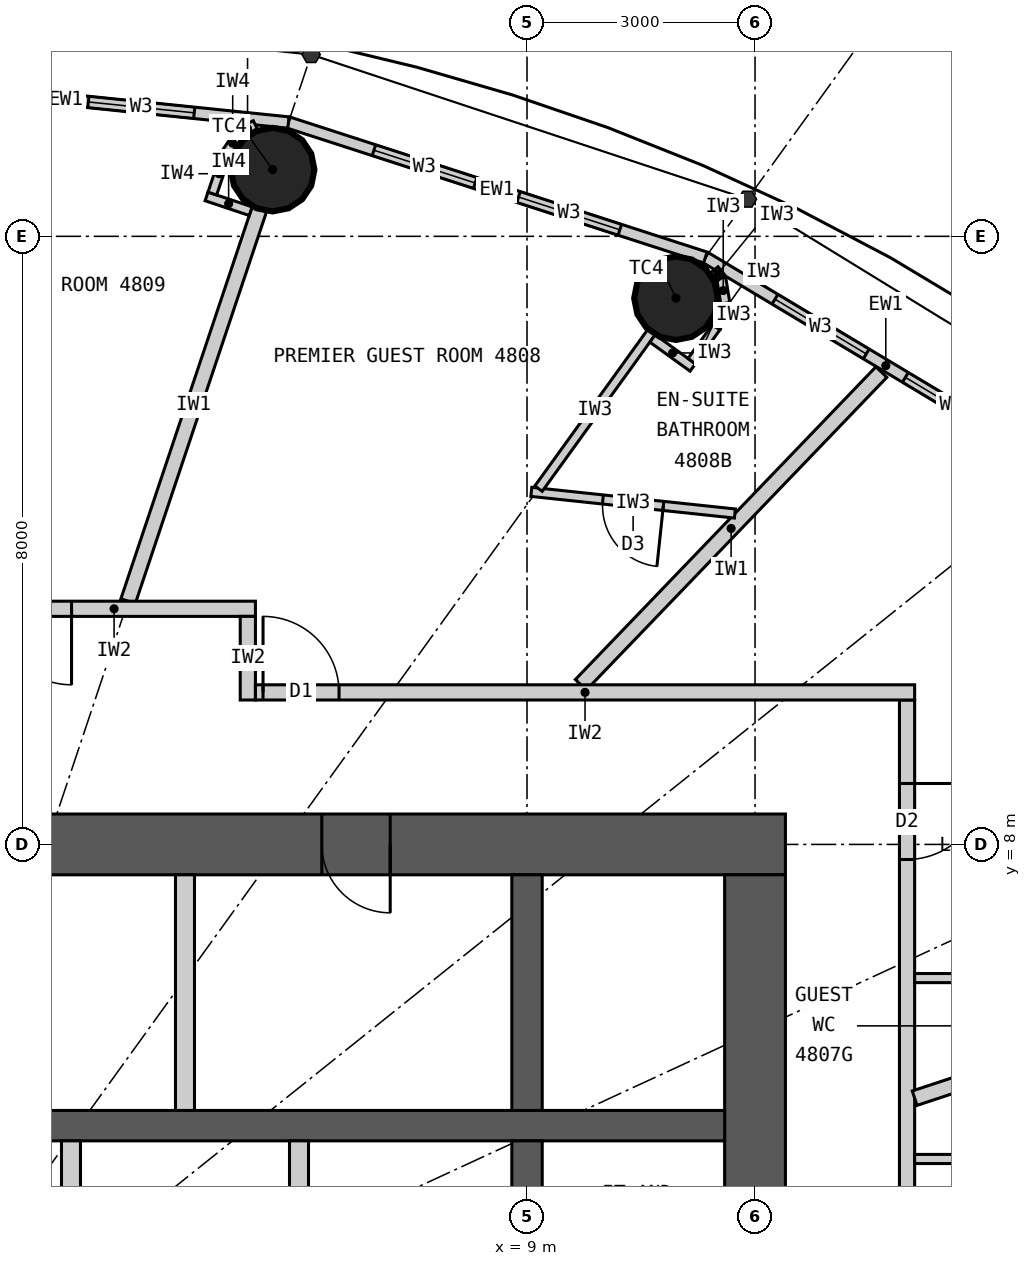
"""IFC4 building model, lengths in metres.
Left out: names, types, materials, properties, quantities, classifications, styles, units other than length and angle.
Written with IfcOpenShell. Run it as: python <this file> out.ifc"""

import sys

from ifc_helpers import new_model, si_unit, direction, frame, frame_2d, origin, origin_2d, place, context, subcontext, project, spatial, rectangle, circle, extrude, element, fill, save


model = new_model("IFC4")
c1 = context("Model", 3, precision=1e-05, world=origin(), true_north=direction((0.0, 1.0)))
c2 = subcontext(c1, "Body", "Model", "MODEL_VIEW")
j1 = project(units=[si_unit("LENGTHUNIT", "METRE"), si_unit("PLANEANGLEUNIT", "RADIAN")], contexts=[c1])
p1 = place(None, origin())
s1 = spatial("IfcSite", under=j1, at=p1, CompositionType="ELEMENT")
p2 = place(p1, origin())
s2 = spatial("IfcBuilding", under=s1, at=p2, CompositionType="ELEMENT")
p3 = place(p2, frame((0.0, 0.0, 179.7)))
s3 = spatial("IfcBuildingStorey", under=s2, at=p3, CompositionType="ELEMENT", Elevation=179.7)
for number, where, z_axis, x_axis in (
    (1, (10.96, 15.186, 0.0), (0.0, 0.0, 1.0), (1.0, 0.0, 0.0)),
    (2, (5.653, 16.877, 0.0), (0.0, 0.0, 1.0), (1.0, 0.0, 0.0)),
):
    element("IfcColumn", number, at=place(p3, frame(where, z_axis=z_axis, x_axis=x_axis)), inside=s3, PredefinedType="COLUMN", context=c2, shape_type="SweptSolid", body=[
        extrude(circle(Radius=0.55, at=origin_2d()), origin(), (0.0, 0.0, 1.0), 3.3),
    ])
p4 = place(p3, frame((-12.4, 8.0, 0.0), z_axis=(0.0, 0.0, 1.0), x_axis=(1.0, 0.0, 0.0)))
e3 = element("IfcWall", 3, at=p4, inside=s3, PredefinedType="SHEAR", context=c2, shape_type="SweptSolid", body=[
    extrude(rectangle(XDim=24.8, YDim=0.8, at=frame_2d((12.4, 0.0))), origin(), (0.0, 0.0, 1.0), 3.3),
])
p5 = place(p4, frame((11.1, 0.0, 0.0)))
e4 = element("IfcOpeningElement", 4, at=p5, cuts=e3, PredefinedType="OPENING", context=c2, shape_type="SweptSolid", body=[
    extrude(rectangle(XDim=1.2, YDim=2.2, at=frame_2d((0.6, 1.1))), frame((0.0, 0.41, 0.0), z_axis=(0.0, -1.0, 0.0), x_axis=(1.0, 0.0, 0.0)), (0.0, 0.0, 1.0), 0.82),
])
p6 = place(p4, frame((18.7, 0.0, 0.0)))
e5 = element("IfcOpeningElement", 5, at=p6, cuts=e3, PredefinedType="OPENING", context=c2, shape_type="SweptSolid", body=[
    extrude(rectangle(XDim=0.9, YDim=2.2, at=frame_2d((0.45, 1.1))), frame((0.0, 0.41, 0.0), z_axis=(0.0, -1.0, 0.0), x_axis=(1.0, 0.0, 0.0)), (0.0, 0.0, 1.0), 0.82),
])
p7 = place(p3, frame((12.0, -7.6, 0.0), z_axis=(0.0, 0.0, 1.0), x_axis=(0.0, 1.0, 0.0)))
e6 = element("IfcWall", 6, at=p7, inside=s3, PredefinedType="SHEAR", context=c2, shape_type="SweptSolid", body=[
    extrude(rectangle(XDim=15.2, YDim=0.8, at=frame_2d((7.6, 0.0))), origin(), (0.0, 0.0, 1.0), 3.3),
])
p8 = place(p7, frame((6.7, 0.0, 0.0)))
e7 = element("IfcOpeningElement", 7, at=p8, cuts=e6, PredefinedType="OPENING", context=c2, shape_type="SweptSolid", body=[
    extrude(rectangle(XDim=1.8, YDim=2.2, at=frame_2d((0.9, 1.1))), frame((0.0, 0.41, 0.0), z_axis=(0.0, -1.0, 0.0), x_axis=(1.0, 0.0, 0.0)), (0.0, 0.0, 1.0), 0.82),
])
p9 = place(p3, frame((-11.6, 4.3, 0.0), z_axis=(0.0, 0.0, 1.0), x_axis=(1.0, 0.0, 0.0)))
e8 = element("IfcWall", 8, at=p9, inside=s3, PredefinedType="SHEAR", context=c2, shape_type="SweptSolid", body=[
    extrude(rectangle(XDim=23.2, YDim=0.4, at=frame_2d((11.6, 0.0))), origin(), (0.0, 0.0, 1.0), 3.3),
])
p10 = place(p3, frame((9.0, 4.5, 0.0), z_axis=(0.0, 0.0, 1.0), x_axis=(0.0, 1.0, 0.0)))
e9 = element("IfcWall", 9, at=p10, inside=s3, PredefinedType="SHEAR", context=c2, shape_type="SweptSolid", body=[
    extrude(rectangle(XDim=3.1, YDim=0.4, at=frame_2d((1.55, 0.0))), origin(), (0.0, 0.0, 1.0), 3.3),
])
p11 = place(p3, frame((9.0, 1.75, 0.0), z_axis=(0.0, 0.0, 1.0), x_axis=(0.0, 1.0, 0.0)))
e10 = element("IfcWall", 10, at=p11, inside=s3, PredefinedType="SHEAR", context=c2, shape_type="SweptSolid", body=[
    extrude(rectangle(XDim=2.35, YDim=0.4, at=frame_2d((1.175, 0.0))), origin(), (0.0, 0.0, 1.0), 3.3),
])
p12 = place(p3, frame((4.5, 4.5, 0.0), z_axis=(0.0, 0.0, 1.0), x_axis=(0.0, 1.0, 0.0)))
e11 = element("IfcWall", 11, at=p12, inside=s3, PredefinedType="PARTITIONING", context=c2, shape_type="SweptSolid", body=[
    extrude(rectangle(XDim=3.1, YDim=0.25, at=frame_2d((1.55, 0.0))), origin(), (0.0, 0.0, 1.0), 3.3),
])
for number, where, z_axis, x_axis in (
    (12, (3.0, 1.75, 0.0), (0.0, 0.0, 1.0), (0.0, 1.0, 0.0)),
    (13, (6.0, 1.75, 0.0), (0.0, 0.0, 1.0), (0.0, 1.0, 0.0)),
):
    element("IfcWall", number, at=place(p3, frame(where, z_axis=z_axis, x_axis=x_axis)), inside=s3, PredefinedType="PARTITIONING", context=c2, shape_type="SweptSolid", body=[
        extrude(rectangle(XDim=2.35, YDim=0.25, at=frame_2d((1.175, 0.0))), origin(), (0.0, 0.0, 1.0), 3.3),
    ])
p13 = place(p3, frame((16.095, 12.876, 0.0), z_axis=(0.0, 0.0, 1.0), x_axis=(-0.857695199231, 0.514158482587, 0.0)))
e14 = element("IfcWall", 14, at=p13, inside=s3, PredefinedType="ELEMENTEDWALL", context=c2, shape_type="SweptSolid", body=[
    extrude(rectangle(XDim=5.536, YDim=0.15, at=frame_2d((2.768, 0.0))), origin(), (0.0, 0.0, 1.0), 3.12),
])
p14 = place(p13, frame((1.068, 0.0, 0.9)))
e15 = element("IfcOpeningElement", 15, at=p14, cuts=e14, PredefinedType="OPENING", context=c2, shape_type="SweptSolid", body=[
    extrude(rectangle(XDim=1.4, YDim=1.9, at=frame_2d((0.7, 0.95))), frame((0.0, 0.085, 0.0), z_axis=(0.0, -1.0, 0.0), x_axis=(1.0, 0.0, 0.0)), (0.0, 0.0, 1.0), 0.17),
])
p15 = place(p13, frame((3.068, 0.0, 0.9)))
e16 = element("IfcOpeningElement", 16, at=p15, cuts=e14, PredefinedType="OPENING", context=c2, shape_type="SweptSolid", body=[
    extrude(rectangle(XDim=1.4, YDim=1.9, at=frame_2d((0.7, 0.95))), frame((0.0, 0.085, 0.0), z_axis=(0.0, -1.0, 0.0), x_axis=(1.0, 0.0, 0.0)), (0.0, 0.0, 1.0), 0.17),
])
p16 = place(p3, frame((11.346, 15.722, 0.0), z_axis=(0.0, 0.0, 1.0), x_axis=(-0.951432482129, 0.307857486429, 0.0)))
e17 = element("IfcWall", 17, at=p16, inside=s3, PredefinedType="ELEMENTEDWALL", context=c2, shape_type="SweptSolid", body=[
    extrude(rectangle(XDim=5.766, YDim=0.15, at=frame_2d((2.883, 0.0))), origin(), (0.0, 0.0, 1.0), 3.12),
])
p17 = place(p16, frame((1.183, 0.0, 0.9)))
e18 = element("IfcOpeningElement", 18, at=p17, cuts=e17, PredefinedType="OPENING", context=c2, shape_type="SweptSolid", body=[
    extrude(rectangle(XDim=1.4, YDim=1.9, at=frame_2d((0.7, 0.95))), frame((0.0, 0.085, 0.0), z_axis=(0.0, -1.0, 0.0), x_axis=(1.0, 0.0, 0.0)), (0.0, 0.0, 1.0), 0.17),
])
p18 = place(p16, frame((3.183, 0.0, 0.9)))
e19 = element("IfcOpeningElement", 19, at=p18, cuts=e17, PredefinedType="OPENING", context=c2, shape_type="SweptSolid", body=[
    extrude(rectangle(XDim=1.4, YDim=1.9, at=frame_2d((0.7, 0.95))), frame((0.0, 0.085, 0.0), z_axis=(0.0, -1.0, 0.0), x_axis=(1.0, 0.0, 0.0)), (0.0, 0.0, 1.0), 0.17),
])
p19 = place(p3, frame((5.86, 17.497, 0.0), z_axis=(0.0, 0.0, 1.0), x_axis=(-0.994751738032, 0.102318032045, 0.0)))
e20 = element("IfcWall", 20, at=p19, inside=s3, PredefinedType="ELEMENTEDWALL", context=c2, shape_type="SweptSolid", body=[
    extrude(rectangle(XDim=5.891, YDim=0.15, at=frame_2d((2.946, 0.0))), origin(), (0.0, 0.0, 1.0), 3.12),
])
p20 = place(p19, frame((1.246, 0.0, 0.9)))
e21 = element("IfcOpeningElement", 21, at=p20, cuts=e20, PredefinedType="OPENING", context=c2, shape_type="SweptSolid", body=[
    extrude(rectangle(XDim=1.4, YDim=1.9, at=frame_2d((0.7, 0.95))), frame((0.0, 0.085, 0.0), z_axis=(0.0, -1.0, 0.0), x_axis=(1.0, 0.0, 0.0)), (0.0, 0.0, 1.0), 0.17),
])
p21 = place(p19, frame((3.246, 0.0, 0.9)))
e22 = element("IfcOpeningElement", 22, at=p21, cuts=e20, PredefinedType="OPENING", context=c2, shape_type="SweptSolid", body=[
    extrude(rectangle(XDim=1.4, YDim=1.9, at=frame_2d((0.7, 0.95))), frame((0.0, 0.085, 0.0), z_axis=(0.0, -1.0, 0.0), x_axis=(1.0, 0.0, 0.0)), (0.0, 0.0, 1.0), 0.17),
])
p22 = place(p3, frame((14.0, -9.9, 0.0), z_axis=(0.0, 0.0, 1.0), x_axis=(0.0, 1.0, 0.0)))
e23 = element("IfcWall", 23, at=p22, inside=s3, PredefinedType="PARTITIONING", context=c2, shape_type="SweptSolid", body=[
    extrude(rectangle(XDim=19.8, YDim=0.2, at=frame_2d((9.9, 0.0))), origin(), (0.0, 0.0, 1.0), 3.12),
])
p23 = place(p22, frame((4.268, 0.0, 0.0)))
e24 = element("IfcOpeningElement", 24, at=p23, cuts=e23, PredefinedType="OPENING", context=c2, shape_type="SweptSolid", body=[
    extrude(rectangle(XDim=1.0, YDim=2.2, at=frame_2d((0.5, 1.1))), frame((0.0, 0.11, 0.0), z_axis=(0.0, -1.0, 0.0), x_axis=(1.0, 0.0, 0.0)), (0.0, 0.0, 1.0), 0.22),
])
p24 = place(p22, frame((7.177, 0.0, 0.0)))
e25 = element("IfcOpeningElement", 25, at=p24, cuts=e23, PredefinedType="OPENING", context=c2, shape_type="SweptSolid", body=[
    extrude(rectangle(XDim=1.0, YDim=2.2, at=frame_2d((0.5, 1.1))), frame((0.0, 0.11, 0.0), z_axis=(0.0, -1.0, 0.0), x_axis=(1.0, 0.0, 0.0)), (0.0, 0.0, 1.0), 0.22),
])
p25 = place(p22, frame((17.701, 0.0, 0.0)))
e26 = element("IfcOpeningElement", 26, at=p25, cuts=e23, PredefinedType="OPENING", context=c2, shape_type="SweptSolid", body=[
    extrude(rectangle(XDim=1.0, YDim=2.2, at=frame_2d((0.5, 1.1))), frame((0.0, 0.11, 0.0), z_axis=(0.0, -1.0, 0.0), x_axis=(1.0, 0.0, 0.0)), (0.0, 0.0, 1.0), 0.22),
])
p26 = place(p3, frame((14.1, 4.661, 0.0), z_axis=(0.0, 0.0, 1.0), x_axis=(0.949453216399, 0.313908569285, 0.0)))
e27 = element("IfcWall", 27, at=p26, inside=s3, PredefinedType="PARTITIONING", context=c2, shape_type="SweptSolid", body=[
    extrude(rectangle(XDim=7.109, YDim=0.2, at=frame_2d((3.554, 0.0))), origin(), (0.0, 0.0, 1.0), 3.12),
])
p27 = place(p26, frame((2.07, 0.0, 0.0)))
e28 = element("IfcOpeningElement", 28, at=p27, cuts=e27, PredefinedType="OPENING", context=c2, shape_type="SweptSolid", body=[
    extrude(rectangle(XDim=0.9, YDim=2.1, at=frame_2d((0.45, 1.05))), frame((0.0, 0.11, 0.0), z_axis=(0.0, -1.0, 0.0), x_axis=(1.0, 0.0, 0.0)), (0.0, 0.0, 1.0), 0.22),
])
p28 = place(p3, frame((9.708, 10.1, 0.0), z_axis=(0.0, 0.0, 1.0), x_axis=(0.692978748441, 0.720958011405, 0.0)))
e29 = element("IfcWall", 29, at=p28, inside=s3, PredefinedType="PARTITIONING", context=c2, shape_type="SweptSolid", body=[
    extrude(rectangle(XDim=5.707, YDim=0.2, at=frame_2d((2.853, 0.0))), origin(), (0.0, 0.0, 1.0), 3.12),
])
p29 = place(p3, frame((3.751, 11.2, 0.0), z_axis=(0.0, 0.0, 1.0), x_axis=(0.317614803807, 0.948219824937, 0.0)))
e30 = element("IfcWall", 30, at=p29, inside=s3, PredefinedType="PARTITIONING", context=c2, shape_type="SweptSolid", body=[
    extrude(rectangle(XDim=5.438, YDim=0.2, at=frame_2d((2.719, 0.0))), origin(), (0.0, 0.0, 1.0), 2.27),
])
p30 = place(p3, frame((1.708, 11.1, 0.0), z_axis=(0.0, 0.0, 1.0), x_axis=(1.0, 0.0, 0.0)))
e31 = element("IfcWall", 31, at=p30, inside=s3, PredefinedType="PARTITIONING", context=c2, shape_type="SweptSolid", body=[
    extrude(rectangle(XDim=3.719, YDim=0.2, at=frame_2d((1.86, 0.0))), origin(), (0.0, 0.0, 1.0), 3.12),
])
p31 = place(p30, frame((0.3, 0.0, 0.0)))
e32 = element("IfcOpeningElement", 32, at=p31, cuts=e31, PredefinedType="OPENING", context=c2, shape_type="SweptSolid", body=[
    extrude(rectangle(XDim=1.0, YDim=2.2, at=frame_2d((0.5, 1.1))), frame((0.0, 0.11, 0.0), z_axis=(0.0, -1.0, 0.0), x_axis=(1.0, 0.0, 0.0)), (0.0, 0.0, 1.0), 0.22),
])
p32 = place(p3, frame((5.327, 9.9, 0.0), z_axis=(0.0, 0.0, 1.0), x_axis=(0.0, 1.0, 0.0)))
e33 = element("IfcWall", 33, at=p32, inside=s3, PredefinedType="PARTITIONING", context=c2, shape_type="SweptSolid", body=[
    extrude(rectangle(XDim=1.1, YDim=0.2, at=frame_2d((0.55, 0.0))), origin(), (0.0, 0.0, 1.0), 3.12),
])
p33 = place(p3, frame((14.1, 3.862, 0.0), z_axis=(0.0, 0.0, 1.0), x_axis=(1.0, 0.0, 0.0)))
e34 = element("IfcWall", 34, at=p33, inside=s3, PredefinedType="PARTITIONING", context=c2, shape_type="SweptSolid", body=[
    extrude(rectangle(XDim=2.54, YDim=0.12, at=frame_2d((1.27, 0.0))), origin(), (0.0, 0.0, 1.0), 2.27),
])
p34 = place(p33, frame((0.75, 0.0, 0.0)))
e35 = element("IfcOpeningElement", 35, at=p34, cuts=e34, PredefinedType="OPENING", context=c2, shape_type="SweptSolid", body=[
    extrude(rectangle(XDim=0.8, YDim=2.1, at=frame_2d((0.4, 1.05))), frame((0.0, 0.07, 0.0), z_axis=(0.0, -1.0, 0.0), x_axis=(1.0, 0.0, 0.0)), (0.0, 0.0, 1.0), 0.14),
])
p35 = place(p3, frame((14.1, 6.241, 0.0), z_axis=(0.0, 0.0, 1.0), x_axis=(1.0, 0.0, 0.0)))
e36 = element("IfcWall", 36, at=p35, inside=s3, PredefinedType="PARTITIONING", context=c2, shape_type="SweptSolid", body=[
    extrude(rectangle(XDim=1.54, YDim=0.12, at=frame_2d((0.77, 0.0))), origin(), (0.0, 0.0, 1.0), 3.12),
])
p36 = place(p35, frame((0.59, 0.0, 0.0)))
e37 = element("IfcOpeningElement", 37, at=p36, cuts=e36, PredefinedType="OPENING", context=c2, shape_type="SweptSolid", body=[
    extrude(rectangle(XDim=0.8, YDim=2.1, at=frame_2d((0.4, 1.05))), frame((0.0, 0.07, 0.0), z_axis=(0.0, -1.0, 0.0), x_axis=(1.0, 0.0, 0.0)), (0.0, 0.0, 1.0), 0.14),
])
p37 = place(p3, frame((11.735, 12.353, 0.0), z_axis=(0.0, 0.0, 1.0), x_axis=(-0.994390130276, 0.105774613256, 0.0)))
e38 = element("IfcWall", 38, at=p37, inside=s3, PredefinedType="PARTITIONING", context=c2, shape_type="SweptSolid", body=[
    extrude(rectangle(XDim=2.694, YDim=0.12, at=frame_2d((1.347, 0.0))), origin(), (0.0, 0.0, 1.0), 3.12),
])
p38 = place(p37, frame((0.947, 0.0, 0.0)))
e39 = element("IfcOpeningElement", 39, at=p38, cuts=e38, PredefinedType="OPENING", context=c2, shape_type="SweptSolid", body=[
    extrude(rectangle(XDim=0.8, YDim=2.1, at=frame_2d((0.4, 1.05))), frame((0.0, 0.07, 0.0), z_axis=(0.0, -1.0, 0.0), x_axis=(1.0, 0.0, 0.0)), (0.0, 0.0, 1.0), 0.14),
])
p39 = place(p3, frame((9.151, 12.681, 0.0), z_axis=(0.0, 0.0, 1.0), x_axis=(0.585258912334, 0.8108464747, 0.0)))
e40 = element("IfcWall", 40, at=p39, inside=s3, PredefinedType="PARTITIONING", context=c2, shape_type="SweptSolid", body=[
    extrude(rectangle(XDim=2.54, YDim=0.12, at=frame_2d((1.27, 0.0))), origin(), (0.0, 0.0, 1.0), 2.27),
])
p40 = place(p3, frame((10.651, 14.656, 0.0), z_axis=(0.0, 0.0, 1.0), x_axis=(0.810916094797, -0.585162445137, 0.0)))
e41 = element("IfcWall", 41, at=p40, inside=s3, PredefinedType="PARTITIONING", context=c2, shape_type="SweptSolid", body=[
    extrude(rectangle(XDim=0.652, YDim=0.12, at=frame_2d((0.326, 0.0))), origin(), (0.0, 0.0, 1.0), 3.12),
])
p41 = place(p3, frame((11.167, 14.359, 0.0), z_axis=(0.0, 0.0, 1.0), x_axis=(0.585263549799, 0.810843127415, 0.0)))
e42 = element("IfcWall", 42, at=p41, inside=s3, PredefinedType="PARTITIONING", context=c2, shape_type="SweptSolid", body=[
    extrude(rectangle(XDim=0.55, YDim=0.12, at=frame_2d((0.275, 0.0))), origin(), (0.0, 0.0, 1.0), 3.12),
])
for number, where, z_axis, x_axis in (
    (43, (11.489, 14.804, 0.0), (0.0, 0.0, 1.0), (0.356, 0.935, 0.0)),
    (44, (11.609, 15.12, 0.0), (0.0, 0.0, 1.0), (-0.16, 0.987, 0.0)),
):
    element("IfcWall", number, at=place(p3, frame(where, z_axis=z_axis, x_axis=x_axis)), inside=s3, PredefinedType="PARTITIONING", context=c2, shape_type="SweptSolid", body=[
        extrude(rectangle(XDim=0.338, YDim=0.12, at=frame_2d((0.169, 0.0))), origin(), (0.0, 0.0, 1.0), 3.12),
    ])
p42 = place(p3, frame((11.555, 15.453, 0.0), z_axis=(0.0, 0.0, 1.0), x_axis=(-0.631711901025, 0.775203246964, 0.0)))
e45 = element("IfcWall", 45, at=p42, inside=s3, PredefinedType="PARTITIONING", context=c2, shape_type="SweptSolid", body=[
    extrude(rectangle(XDim=0.139, YDim=0.12, at=frame_2d((0.07, 0.0))), origin(), (0.0, 0.0, 1.0), 3.12),
])
p43 = place(p3, frame((5.427, 10.0, 0.0), z_axis=(0.0, 0.0, 1.0), x_axis=(1.0, 0.0, 0.0)))
e46 = element("IfcWall", 46, at=p43, inside=s3, PredefinedType="PARTITIONING", context=c2, shape_type="SweptSolid", body=[
    extrude(rectangle(XDim=8.673, YDim=0.2, at=frame_2d((4.337, 0.0))), origin(), (0.0, 0.0, 1.0), 3.12),
])
p44 = place(p43, frame((0.1, 0.0, 0.0)))
e47 = element("IfcOpeningElement", 47, at=p44, cuts=e46, PredefinedType="OPENING", context=c2, shape_type="SweptSolid", body=[
    extrude(rectangle(XDim=1.0, YDim=2.2, at=frame_2d((0.5, 1.1))), frame((0.0, 0.11, 0.0), z_axis=(0.0, -1.0, 0.0), x_axis=(1.0, 0.0, 0.0)), (0.0, 0.0, 1.0), 0.22),
])
p45 = place(p3, frame((5.364, 16.331, 0.0), z_axis=(0.0, 0.0, 1.0), x_axis=(-0.948283770087, 0.317423835572, 0.0)))
e48 = element("IfcWall", 48, at=p45, inside=s3, PredefinedType="PARTITIONING", context=c2, shape_type="SweptSolid", body=[
    extrude(rectangle(XDim=0.612, YDim=0.12, at=frame_2d((0.306, 0.0))), origin(), (0.0, 0.0, 1.0), 3.12),
])
p46 = place(p3, frame((4.86, 16.563, 0.0), z_axis=(0.0, 0.0, 1.0), x_axis=(0.317825321803, 0.948149284038, 0.0)))
e49 = element("IfcWall", 49, at=p46, inside=s3, PredefinedType="PARTITIONING", context=c2, shape_type="SweptSolid", body=[
    extrude(rectangle(XDim=0.55, YDim=0.12, at=frame_2d((0.275, 0.0))), origin(), (0.0, 0.0, 1.0), 3.12),
])
p47 = place(p3, frame((5.034, 17.084, 0.0), z_axis=(0.0, 0.0, 1.0), x_axis=(0.552362205726, 0.833604218851, 0.0)))
e50 = element("IfcWall", 50, at=p47, inside=s3, PredefinedType="PARTITIONING", context=c2, shape_type="SweptSolid", body=[
    extrude(rectangle(XDim=0.338, YDim=0.12, at=frame_2d((0.169, 0.0))), origin(), (0.0, 0.0, 1.0), 3.12),
])
p48 = place(p3, frame((5.221, 17.366, 0.0), z_axis=(0.0, 0.0, 1.0), x_axis=(0.895067896179, 0.445929883759, 0.0)))
e51 = element("IfcWall", 51, at=p48, inside=s3, PredefinedType="PARTITIONING", context=c2, shape_type="SweptSolid", body=[
    extrude(rectangle(XDim=0.228, YDim=0.12, at=frame_2d((0.114, 0.0))), origin(), (0.0, 0.0, 1.0), 3.12),
])
p49 = place(p14, origin())
e52 = element("IfcWindow", 52, at=p49, inside=s3, PartitioningType="SINGLE_PANEL", PredefinedType="WINDOW", context=c2, shape_type="SweptSolid", body=[
    extrude(rectangle(XDim=1.4, YDim=1.9, at=frame_2d((0.7, 0.95))), frame((0.0, 0.03, 0.0), z_axis=(0.0, -1.0, 0.0), x_axis=(1.0, 0.0, 0.0)), (0.0, 0.0, 1.0), 0.06),
])
fill(e15, e52)
p50 = place(p15, origin())
e53 = element("IfcWindow", 53, at=p50, inside=s3, PartitioningType="SINGLE_PANEL", PredefinedType="WINDOW", context=c2, shape_type="SweptSolid", body=[
    extrude(rectangle(XDim=1.4, YDim=1.9, at=frame_2d((0.7, 0.95))), frame((0.0, 0.03, 0.0), z_axis=(0.0, -1.0, 0.0), x_axis=(1.0, 0.0, 0.0)), (0.0, 0.0, 1.0), 0.06),
])
fill(e16, e53)
p51 = place(p17, origin())
e54 = element("IfcWindow", 54, at=p51, inside=s3, PartitioningType="SINGLE_PANEL", PredefinedType="WINDOW", context=c2, shape_type="SweptSolid", body=[
    extrude(rectangle(XDim=1.4, YDim=1.9, at=frame_2d((0.7, 0.95))), frame((0.0, 0.03, 0.0), z_axis=(0.0, -1.0, 0.0), x_axis=(1.0, 0.0, 0.0)), (0.0, 0.0, 1.0), 0.06),
])
fill(e18, e54)
p52 = place(p18, origin())
e55 = element("IfcWindow", 55, at=p52, inside=s3, PartitioningType="SINGLE_PANEL", PredefinedType="WINDOW", context=c2, shape_type="SweptSolid", body=[
    extrude(rectangle(XDim=1.4, YDim=1.9, at=frame_2d((0.7, 0.95))), frame((0.0, 0.03, 0.0), z_axis=(0.0, -1.0, 0.0), x_axis=(1.0, 0.0, 0.0)), (0.0, 0.0, 1.0), 0.06),
])
fill(e19, e55)
p53 = place(p20, origin())
e56 = element("IfcWindow", 56, at=p53, inside=s3, PartitioningType="SINGLE_PANEL", PredefinedType="WINDOW", context=c2, shape_type="SweptSolid", body=[
    extrude(rectangle(XDim=1.4, YDim=1.9, at=frame_2d((0.7, 0.95))), frame((0.0, 0.03, 0.0), z_axis=(0.0, -1.0, 0.0), x_axis=(1.0, 0.0, 0.0)), (0.0, 0.0, 1.0), 0.06),
])
fill(e21, e56)
p54 = place(p25, origin())
e57 = element("IfcDoor", 57, at=p54, inside=s3, OperationType="SINGLE_SWING_RIGHT", PredefinedType="DOOR", context=c2, shape_type="SweptSolid", body=[
    extrude(rectangle(XDim=1.0, YDim=2.2, at=frame_2d((0.5, 1.1))), frame((0.0, 0.025, 0.0), z_axis=(0.0, -1.0, 0.0), x_axis=(1.0, 0.0, 0.0)), (0.0, 0.0, 1.0), 0.05),
])
fill(e26, e57)
p55 = place(p38, origin())
e58 = element("IfcDoor", 58, at=p55, inside=s3, OperationType="SINGLE_SWING_LEFT", PredefinedType="DOOR", context=c2, shape_type="SweptSolid", body=[
    extrude(rectangle(XDim=0.8, YDim=2.1, at=frame_2d((0.4, 1.05))), frame((0.0, 0.025, 0.0), z_axis=(0.0, -1.0, 0.0), x_axis=(1.0, 0.0, 0.0)), (0.0, 0.0, 1.0), 0.05),
])
fill(e39, e58)
p56 = place(p44, origin())
e59 = element("IfcDoor", 59, at=p56, inside=s3, OperationType="SINGLE_SWING_LEFT", PredefinedType="DOOR", context=c2, shape_type="SweptSolid", body=[
    extrude(rectangle(XDim=1.0, YDim=2.2, at=frame_2d((0.5, 1.1))), frame((0.0, 0.025, 0.0), z_axis=(0.0, -1.0, 0.0), x_axis=(1.0, 0.0, 0.0)), (0.0, 0.0, 1.0), 0.05),
])
fill(e47, e59)
p57 = place(p31, origin())
e60 = element("IfcDoor", 60, at=p57, inside=s3, OperationType="SINGLE_SWING_RIGHT", PredefinedType="DOOR", context=c2, shape_type="SweptSolid", body=[
    extrude(rectangle(XDim=1.0, YDim=2.2, at=frame_2d((0.5, 1.1))), frame((0.0, 0.025, 0.0), z_axis=(0.0, -1.0, 0.0), x_axis=(1.0, 0.0, 0.0)), (0.0, 0.0, 1.0), 0.05),
])
fill(e32, e60)
p58 = place(p6, origin())
e61 = element("IfcDoor", 61, at=p58, inside=s3, OperationType="SINGLE_SWING_RIGHT", PredefinedType="DOOR", context=c2, shape_type="SweptSolid", body=[
    extrude(rectangle(XDim=0.9, YDim=2.2, at=frame_2d((0.45, 1.1))), frame((0.0, 0.025, 0.0), z_axis=(0.0, -1.0, 0.0), x_axis=(1.0, 0.0, 0.0)), (0.0, 0.0, 1.0), 0.05),
])
fill(e5, e61)
save(model, sys.argv[1])
